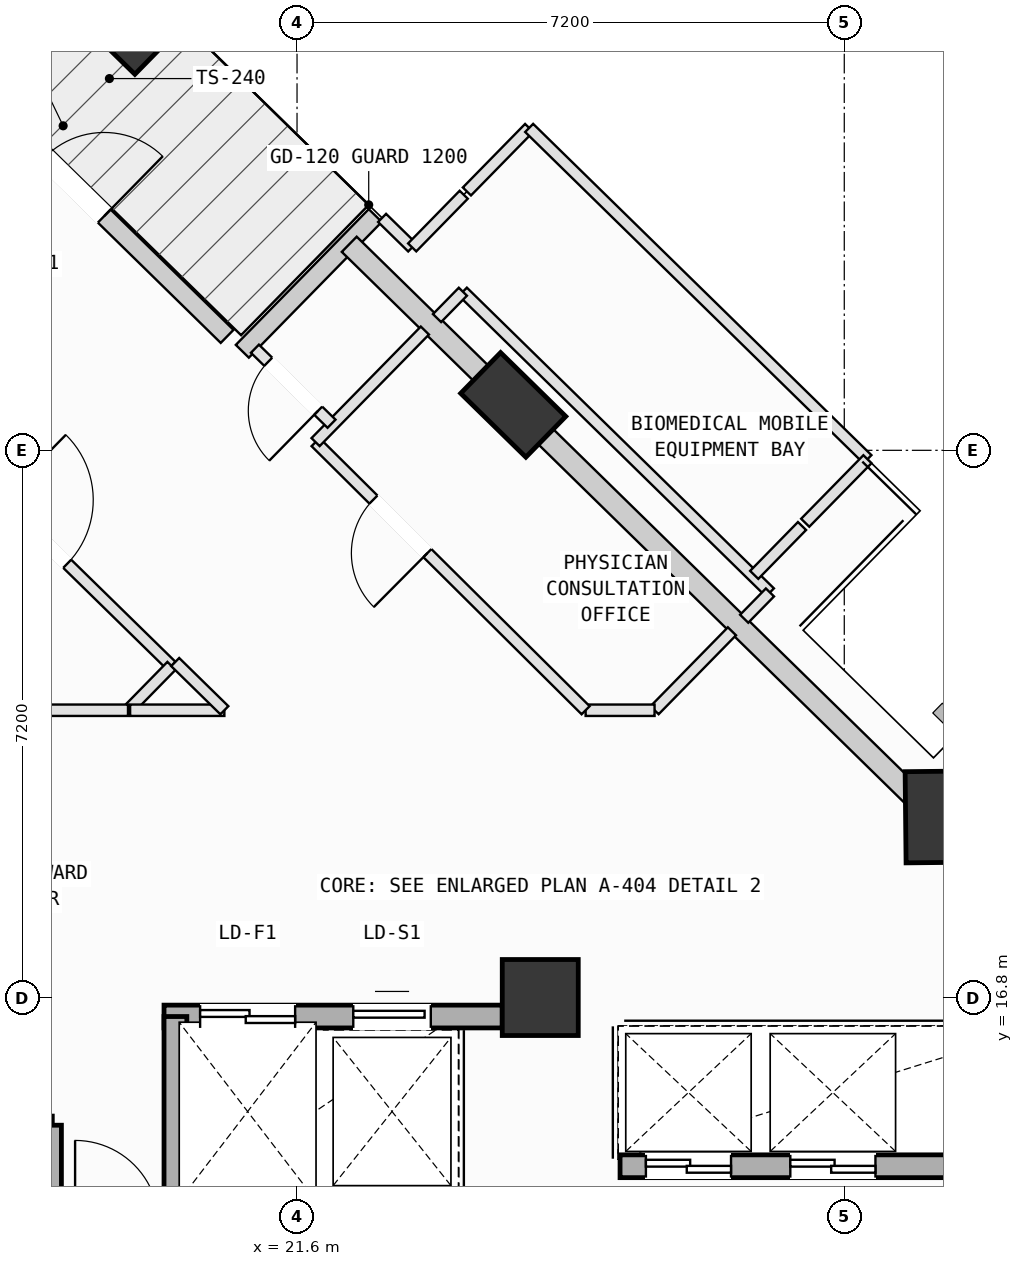
"""IFC4 building model, lengths in metres.
Left out: names, types, materials, properties, quantities, classifications, styles, units other than length and angle.
Written with IfcOpenShell. Run it as: python <this file> out.ifc"""

import sys

from ifc_helpers import new_model, si_unit, direction, frame, frame_2d, origin, origin_2d, place, context, subcontext, project, spatial, rectangle, extrude, element, fill, save


model = new_model("IFC4")
c1 = context("Model", 3, precision=1e-05, world=origin(), true_north=direction((0.0, 1.0)))
c2 = subcontext(c1, "Body", "Model", "MODEL_VIEW")
j1 = project(units=[si_unit("LENGTHUNIT", "METRE"), si_unit("PLANEANGLEUNIT", "RADIAN")], contexts=[c1])
p1 = place(None, origin())
s1 = spatial("IfcSite", under=j1, at=p1, CompositionType="ELEMENT")
p2 = place(p1, origin())
s2 = spatial("IfcBuilding", under=s1, at=p2, CompositionType="ELEMENT")
p3 = place(p2, frame((0.0, 0.0, 219.2)))
s3 = spatial("IfcBuildingStorey", under=s2, at=p3, CompositionType="ELEMENT", Elevation=219.2)
p4 = place(p3, frame((24.8, 16.8, 0.0), z_axis=(0.0, 0.0, 1.0), x_axis=(1.0, 0.0, 0.0)))
e1 = element("IfcColumn", 1, at=p4, inside=s3, PredefinedType="COLUMN", context=c2, shape_type="SweptSolid", body=[
    extrude(rectangle(XDim=1.0, YDim=1.0, at=origin_2d()), origin(), (0.0, 0.0, 1.0), 4.0),
])
p5 = place(p3, frame((29.982, 19.176, 0.002), z_axis=(0.023449963828, -0.014778362621, 0.999615775783), x_axis=(-0.851223767602, 0.524070492315, 0.027716719769)))
e2 = element("IfcColumn", 2, at=p5, inside=s3, PredefinedType="COLUMN", context=c2, shape_type="SweptSolid", body=[
    extrude(rectangle(XDim=1.2, YDim=0.75, at=origin_2d()), origin(), (0.0, 0.0, 1.0), 3.998),
])
p6 = place(p3, frame((24.445, 24.598, 0.002), z_axis=(0.001159895474, -0.037910267855, 0.999280474258), x_axis=(-0.735519864847, 0.67698325291, 0.02653683655)))
e3 = element("IfcColumn", 3, at=p6, inside=s3, PredefinedType="COLUMN", context=c2, shape_type="SweptSolid", body=[
    extrude(rectangle(XDim=1.2, YDim=0.75, at=origin_2d()), origin(), (0.0, 0.0, 1.0), 3.999),
])
p7 = place(p3, frame((19.3, 29.635, 0.002), z_axis=(-0.019510987692, -0.059325596951, 0.998047992286), x_axis=(-0.460549166871, 0.886558064773, 0.043695110491)))
e4 = element("IfcColumn", 4, at=p7, inside=s3, PredefinedType="COLUMN", context=c2, shape_type="SweptSolid", body=[
    extrude(rectangle(XDim=1.2, YDim=0.75, at=origin_2d()), origin(), (0.0, 0.0, 1.0), 4.004),
])
p8 = place(p3, frame((15.708, 30.369, 0.0), z_axis=(0.0, 0.0, 1.0), x_axis=(0.71445197499, -0.699684482773, 0.0)))
e5 = element("IfcWall", 5, at=p8, inside=s3, PredefinedType="SOLIDWALL", context=c2, shape_type="SweptSolid", body=[
    extrude(rectangle(XDim=6.96, YDim=0.24, at=frame_2d((3.48, 0.0))), origin(), (0.0, 0.0, 1.0), 3.265),
])
p9 = place(p8, frame((3.597, 0.0, 0.0)))
e6 = element("IfcOpeningElement", 6, at=p9, cuts=e5, PredefinedType="OPENING", context=c2, shape_type="SweptSolid", body=[
    extrude(rectangle(XDim=1.1, YDim=2.15, at=frame_2d((0.55, 1.075))), frame((0.0, 0.13, 0.0), z_axis=(0.0, -1.0, 0.0), x_axis=(1.0, 0.0, 0.0)), (0.0, 0.0, 1.0), 0.26),
])
p10 = place(p3, frame((20.88, 25.303, 0.0), z_axis=(0.0, 0.0, 1.0), x_axis=(0.699645566709, 0.714490084595, 0.0)))
e7 = element("IfcWall", 7, at=p10, inside=s3, PredefinedType="SOLIDWALL", context=c2, shape_type="SweptSolid", body=[
    extrude(rectangle(XDim=2.5, YDim=0.24, at=frame_2d((1.25, 0.0))), origin(), (0.0, 0.0, 1.0), 3.265),
])
p11 = place(p3, frame((24.765, 24.284, 0.0), z_axis=(0.0, 0.0, 1.0), x_axis=(0.714488866676, -0.699646810466, 0.0)))
e8 = element("IfcWall", 8, at=p11, inside=s3, PredefinedType="SOLIDWALL", context=c2, shape_type="SweptSolid", body=[
    extrude(rectangle(XDim=6.958, YDim=0.28, at=frame_2d((3.479, 0.0))), origin(), (0.0, 0.0, 1.0), 3.245),
])
p12 = place(p3, frame((22.287, 26.711, 0.0), z_axis=(0.0, 0.0, 1.0), x_axis=(0.714490507763, -0.699645134562, 0.0)))
e9 = element("IfcWall", 9, at=p12, inside=s3, PredefinedType="SOLIDWALL", context=c2, shape_type="SweptSolid", body=[
    extrude(rectangle(XDim=2.681, YDim=0.28, at=frame_2d((1.34, 0.0))), origin(), (0.0, 0.0, 1.0), 3.245),
])
p13 = place(p3, frame((14.92, 15.12, 0.0), z_axis=(0.0, 0.0, 1.0), x_axis=(1.0, 0.0, 0.0)))
e10 = element("IfcWall", 10, at=p13, inside=s3, PredefinedType="SOLIDWALL", context=c2, shape_type="SweptSolid", body=[
    extrude(rectangle(XDim=3.46, YDim=0.24, at=frame_2d((1.73, 0.0))), origin(), (0.0, 0.0, 1.0), 3.78),
])
p14 = place(p13, frame((0.22, 0.0, 0.0)))
e11 = element("IfcOpeningElement", 11, at=p14, cuts=e10, PredefinedType="OPENING", context=c2, shape_type="SweptSolid", body=[
    extrude(rectangle(XDim=1.1, YDim=2.15, at=frame_2d((0.55, 1.075))), frame((0.0, 0.13, 0.0), z_axis=(0.0, -1.0, 0.0), x_axis=(1.0, 0.0, 0.0)), (0.0, 0.0, 1.0), 0.26),
])
p15 = place(p3, frame((18.38, 15.12, 0.0), z_axis=(0.0, 0.0, 1.0), x_axis=(0.0, -1.0, 0.0)))
e12 = element("IfcWall", 12, at=p15, inside=s3, PredefinedType="SOLIDWALL", context=c2, shape_type="SweptSolid", body=[
    extrude(rectangle(XDim=7.045, YDim=0.24, at=frame_2d((3.522, 0.0))), origin(), (0.0, 0.0, 1.0), 3.78),
])
p16 = place(p3, frame((19.85, 16.55, 0.0), z_axis=(0.0, 0.0, 1.0), x_axis=(1.0, 0.0, 0.0)))
e13 = element("IfcWall", 13, at=p16, inside=s3, PredefinedType="SOLIDWALL", context=c2, shape_type="SweptSolid", body=[
    extrude(rectangle(XDim=4.45, YDim=0.3, at=frame_2d((2.225, 0.0))), origin(), (0.0, 0.0, 1.0), 3.78),
])
p17 = place(p16, frame((0.475, 0.0, 0.0)))
e14 = element("IfcOpeningElement", 14, at=p17, cuts=e13, PredefinedType="OPENING", context=c2, shape_type="SweptSolid", body=[
    extrude(rectangle(XDim=1.25, YDim=2.18, at=frame_2d((0.625, 1.09))), frame((0.0, 0.16, 0.0), z_axis=(0.0, -1.0, 0.0), x_axis=(1.0, 0.0, 0.0)), (0.0, 0.0, 1.0), 0.32),
])
p18 = place(p16, frame((2.49, 0.0, 0.0)))
e15 = element("IfcOpeningElement", 15, at=p18, cuts=e13, PredefinedType="OPENING", context=c2, shape_type="SweptSolid", body=[
    extrude(rectangle(XDim=1.02, YDim=2.12, at=frame_2d((0.51, 1.06))), frame((0.0, 0.16, 0.0), z_axis=(0.0, -1.0, 0.0), x_axis=(1.0, 0.0, 0.0)), (0.0, 0.0, 1.0), 0.32),
])
p19 = place(p3, frame((20.0, 13.82, 0.0), z_axis=(0.0, 0.0, 1.0), x_axis=(0.0, 1.0, 0.0)))
e16 = element("IfcWall", 16, at=p19, inside=s3, PredefinedType="SOLIDWALL", context=c2, shape_type="SweptSolid", body=[
    extrude(rectangle(XDim=2.73, YDim=0.3, at=frame_2d((1.365, 0.0))), origin(), (0.0, 0.0, 1.0), 3.78),
])
p20 = place(p3, frame((25.85, 14.58, 0.0), z_axis=(0.0, 0.0, 1.0), x_axis=(1.0, 0.0, 0.0)))
e17 = element("IfcWall", 17, at=p20, inside=s3, PredefinedType="SOLIDWALL", context=c2, shape_type="SweptSolid", body=[
    extrude(rectangle(XDim=5.45, YDim=0.3, at=frame_2d((2.725, 0.0))), origin(), (0.0, 0.0, 1.0), 3.78),
])
p21 = place(p20, frame((0.34, 0.0, 0.0)))
e18 = element("IfcOpeningElement", 18, at=p21, cuts=e17, PredefinedType="OPENING", context=c2, shape_type="SweptSolid", body=[
    extrude(rectangle(XDim=1.12, YDim=2.15, at=frame_2d((0.56, 1.075))), frame((0.0, 0.16, 0.0), z_axis=(0.0, -1.0, 0.0), x_axis=(1.0, 0.0, 0.0)), (0.0, 0.0, 1.0), 0.32),
])
p22 = place(p20, frame((2.24, 0.0, 0.0)))
e19 = element("IfcOpeningElement", 19, at=p22, cuts=e17, PredefinedType="OPENING", context=c2, shape_type="SweptSolid", body=[
    extrude(rectangle(XDim=1.12, YDim=2.15, at=frame_2d((0.56, 1.075))), frame((0.0, 0.16, 0.0), z_axis=(0.0, -1.0, 0.0), x_axis=(1.0, 0.0, 0.0)), (0.0, 0.0, 1.0), 0.32),
])
p23 = place(p3, frame((16.347, 24.69, 0.0), z_axis=(0.0, 0.0, 1.0), x_axis=(0.714527579213, -0.699607274508, 0.0)))
e20 = element("IfcWall", 20, at=p23, inside=s3, PredefinedType="PARTITIONING", context=c2, shape_type="SweptSolid", body=[
    extrude(rectangle(XDim=5.04, YDim=0.15, at=frame_2d((2.52, 0.0))), origin(), (0.0, 0.0, 1.0), 3.78),
])
p24 = place(p23, frame((1.92, 0.0, 0.0)))
e21 = element("IfcOpeningElement", 21, at=p24, cuts=e20, PredefinedType="OPENING", context=c2, shape_type="SweptSolid", body=[
    extrude(rectangle(XDim=1.2, YDim=2.15, at=frame_2d((0.6, 1.075))), frame((0.0, 0.085, 0.0), z_axis=(0.0, -1.0, 0.0), x_axis=(1.0, 0.0, 0.0)), (0.0, 0.0, 1.0), 0.17),
])
p25 = place(p3, frame((19.948, 21.164, 0.0), z_axis=(0.0, 0.0, 1.0), x_axis=(-0.699751841197, -0.714386002622, 0.0)))
e22 = element("IfcWall", 22, at=p25, inside=s3, PredefinedType="PARTITIONING", context=c2, shape_type="SweptSolid", body=[
    extrude(rectangle(XDim=0.817, YDim=0.15, at=frame_2d((0.409, 0.0))), origin(), (0.0, 0.0, 1.0), 3.78),
])
p26 = place(p3, frame((19.376, 20.58, 0.0), z_axis=(0.0, 0.0, 1.0), x_axis=(-1.0, 0.0, 0.0)))
e23 = element("IfcWall", 23, at=p26, inside=s3, PredefinedType="PARTITIONING", context=c2, shape_type="SweptSolid", body=[
    extrude(rectangle(XDim=4.379, YDim=0.15, at=frame_2d((2.189, 0.0))), origin(), (0.0, 0.0, 1.0), 3.78),
])
p27 = place(p3, frame((23.782, 26.087, 0.0), z_axis=(0.0, 0.0, 1.0), x_axis=(0.71440790838, -0.699729476615, 0.0)))
e24 = element("IfcWall", 24, at=p27, inside=s3, PredefinedType="PARTITIONING", context=c2, shape_type="SweptSolid", body=[
    extrude(rectangle(XDim=5.655, YDim=0.15, at=frame_2d((2.828, 0.0))), origin(), (0.0, 0.0, 1.0), 3.78),
])
p28 = place(p3, frame((27.822, 22.13, 0.0), z_axis=(0.0, 0.0, 1.0), x_axis=(-0.700015982854, -0.714127176173, 0.0)))
e25 = element("IfcWall", 25, at=p28, inside=s3, PredefinedType="PARTITIONING", context=c2, shape_type="SweptSolid", body=[
    extrude(rectangle(XDim=0.484, YDim=0.15, at=frame_2d((0.242, 0.0))), origin(), (0.0, 0.0, 1.0), 3.78),
])
p29 = place(p3, frame((27.322, 21.619, 0.0), z_axis=(0.0, 0.0, 1.0), x_axis=(-0.69993714437, -0.714204448272, 0.0)))
e26 = element("IfcWall", 26, at=p29, inside=s3, PredefinedType="PARTITIONING", context=c2, shape_type="SweptSolid", body=[
    extrude(rectangle(XDim=1.455, YDim=0.15, at=frame_2d((0.727, 0.0))), origin(), (0.0, 0.0, 1.0), 3.78),
])
p30 = place(p3, frame((26.304, 20.58, 0.0), z_axis=(0.0, 0.0, 1.0), x_axis=(-1.0, 0.0, 0.0)))
e27 = element("IfcWall", 27, at=p30, inside=s3, PredefinedType="PARTITIONING", context=c2, shape_type="SweptSolid", body=[
    extrude(rectangle(XDim=0.907, YDim=0.15, at=frame_2d((0.454, 0.0))), origin(), (0.0, 0.0, 1.0), 3.78),
])
p31 = place(p3, frame((25.397, 20.58, 0.0), z_axis=(0.0, 0.0, 1.0), x_axis=(-0.709613494775, 0.704591149557, 0.0)))
e28 = element("IfcWall", 28, at=p31, inside=s3, PredefinedType="PARTITIONING", context=c2, shape_type="SweptSolid", body=[
    extrude(rectangle(XDim=5.007, YDim=0.15, at=frame_2d((2.503, 0.0))), origin(), (0.0, 0.0, 1.0), 3.78),
])
p32 = place(p31, frame((2.934, 0.0, 0.0)))
e29 = element("IfcOpeningElement", 29, at=p32, cuts=e28, PredefinedType="OPENING", context=c2, shape_type="SweptSolid", body=[
    extrude(rectangle(XDim=1.0, YDim=2.12, at=frame_2d((0.5, 1.06))), frame((0.0, 0.085, 0.0), z_axis=(0.0, -1.0, 0.0), x_axis=(1.0, 0.0, 0.0)), (0.0, 0.0, 1.0), 0.17),
])
p33 = place(p3, frame((21.844, 24.108, 0.0), z_axis=(0.0, 0.0, 1.0), x_axis=(0.699762512538, 0.714375549726, 0.0)))
e30 = element("IfcWall", 30, at=p33, inside=s3, PredefinedType="PARTITIONING", context=c2, shape_type="SweptSolid", body=[
    extrude(rectangle(XDim=2.055, YDim=0.15, at=frame_2d((1.027, 0.0))), origin(), (0.0, 0.0, 1.0), 3.78),
])
p34 = place(p3, frame((23.442, 25.74, 0.0), z_axis=(0.0, 0.0, 1.0), x_axis=(0.700036239273, 0.714107319459, 0.0)))
e31 = element("IfcWall", 31, at=p34, inside=s3, PredefinedType="PARTITIONING", context=c2, shape_type="SweptSolid", body=[
    extrude(rectangle(XDim=0.486, YDim=0.15, at=frame_2d((0.243, 0.0))), origin(), (0.0, 0.0, 1.0), 3.78),
])
p35 = place(p3, frame((20.644, 20.58, 0.0), z_axis=(0.0, 0.0, 1.0), x_axis=(-1.0, 0.0, 0.0)))
e32 = element("IfcWall", 32, at=p35, inside=s3, PredefinedType="PARTITIONING", context=c2, shape_type="SweptSolid", body=[
    extrude(rectangle(XDim=1.24, YDim=0.15, at=frame_2d((0.62, 0.0))), origin(), (0.0, 0.0, 1.0), 3.78),
])
p36 = place(p3, frame((19.997, 21.214, 0.0), z_axis=(0.0, 0.0, 1.0), x_axis=(0.714212839143, -0.69992858236, 0.0)))
e33 = element("IfcWall", 33, at=p36, inside=s3, PredefinedType="PARTITIONING", context=c2, shape_type="SweptSolid", body=[
    extrude(rectangle(XDim=0.906, YDim=0.15, at=frame_2d((0.453, 0.0))), origin(), (0.0, 0.0, 1.0), 3.78),
])
p37 = place(p3, frame((22.054, 24.35, 0.0), z_axis=(0.0, 0.0, 1.0), x_axis=(-0.714595133376, 0.699538272973, 0.0)))
e34 = element("IfcWall", 34, at=p37, inside=s3, PredefinedType="PARTITIONING", context=c2, shape_type="SweptSolid", body=[
    extrude(rectangle(XDim=1.411, YDim=0.15, at=frame_2d((0.705, 0.0))), origin(), (0.0, 0.0, 1.0), 3.78),
])
p38 = place(p37, frame((0.245, 0.0, 0.0)))
e35 = element("IfcOpeningElement", 35, at=p38, cuts=e34, PredefinedType="OPENING", context=c2, shape_type="SweptSolid", body=[
    extrude(rectangle(XDim=0.92, YDim=2.1, at=frame_2d((0.46, 1.05))), frame((0.0, 0.085, 0.0), z_axis=(0.0, -1.0, 0.0), x_axis=(1.0, 0.0, 0.0)), (0.0, 0.0, 1.0), 0.17),
])
p39 = place(p3, frame((22.719, 27.058, 0.0), z_axis=(0.0, 0.0, 1.0), x_axis=(0.714115992934, -0.700027391347, 0.0)))
e36 = element("IfcWall", 36, at=p39, inside=s3, PredefinedType="PARTITIONING", context=c2, shape_type="SweptSolid", body=[
    extrude(rectangle(XDim=0.554, YDim=0.15, at=frame_2d((0.277, 0.0))), origin(), (0.0, 0.0, 1.0), 3.78),
])
p40 = place(p3, frame((23.115, 26.67, 0.0), z_axis=(0.0, 0.0, 1.0), x_axis=(0.699257791753, 0.71486959697, 0.0)))
e37 = element("IfcWall", 37, at=p40, inside=s3, PredefinedType="PARTITIONING", context=c2, shape_type="SweptSolid", body=[
    extrude(rectangle(XDim=0.969, YDim=0.15, at=frame_2d((0.485, 0.0))), origin(), (0.0, 0.0, 1.0), 3.78),
])
p41 = place(p3, frame((28.244, 23.004, 0.0), z_axis=(0.0, 0.0, 1.0), x_axis=(-0.699327327342, -0.714801573328, 0.0)))
e38 = element("IfcWall", 38, at=p41, inside=s3, PredefinedType="PARTITIONING", context=c2, shape_type="SweptSolid", body=[
    extrude(rectangle(XDim=0.899, YDim=0.15, at=frame_2d((0.45, 0.0))), origin(), (0.0, 0.0, 1.0), 3.78),
])
p42 = place(p3, frame((23.835, 27.406, 0.0), z_axis=(0.0, 0.0, 1.0), x_axis=(0.699873247093, 0.714267063501, 0.0)))
e39 = element("IfcWall", 39, at=p42, inside=s3, PredefinedType="PARTITIONING", context=c2, shape_type="SweptSolid", body=[
    extrude(rectangle(XDim=1.17, YDim=0.15, at=frame_2d((0.585, 0.0))), origin(), (0.0, 0.0, 1.0), 3.78),
])
p43 = place(p3, frame((24.654, 28.242, 0.0), z_axis=(0.0, 0.0, 1.0), x_axis=(0.714455326906, -0.699681060095, 0.0)))
e40 = element("IfcWall", 40, at=p43, inside=s3, PredefinedType="PARTITIONING", context=c2, shape_type="SweptSolid", body=[
    extrude(rectangle(XDim=6.23, YDim=0.15, at=frame_2d((3.115, 0.0))), origin(), (0.0, 0.0, 1.0), 3.78),
])
p44 = place(p3, frame((29.105, 23.883, 0.0), z_axis=(0.0, 0.0, 1.0), x_axis=(-0.699873247093, -0.714267063501, 0.0)))
e41 = element("IfcWall", 41, at=p44, inside=s3, PredefinedType="PARTITIONING", context=c2, shape_type="SweptSolid", body=[
    extrude(rectangle(XDim=1.17, YDim=0.15, at=frame_2d((0.585, 0.0))), origin(), (0.0, 0.0, 1.0), 3.78),
])
p45 = place(p9, origin())
e42 = element("IfcDoor", 42, at=p45, inside=s3, OperationType="SINGLE_SWING_RIGHT", PredefinedType="DOOR", context=c2, shape_type="SweptSolid", body=[
    extrude(rectangle(XDim=1.1, YDim=2.15, at=frame_2d((0.55, 1.075))), frame((0.0, 0.025, 0.0), z_axis=(0.0, -1.0, 0.0), x_axis=(1.0, 0.0, 0.0)), (0.0, 0.0, 1.0), 0.05),
])
fill(e6, e42)
p46 = place(p21, origin())
e43 = element("IfcDoor", 43, at=p46, inside=s3, OperationType="DOUBLE_DOOR_SLIDING", PredefinedType="DOOR", context=c2, shape_type="SweptSolid", body=[
    extrude(rectangle(XDim=1.12, YDim=2.15, at=frame_2d((0.56, 1.075))), frame((0.0, 0.025, 0.0), z_axis=(0.0, -1.0, 0.0), x_axis=(1.0, 0.0, 0.0)), (0.0, 0.0, 1.0), 0.05),
])
fill(e18, e43)
p47 = place(p22, origin())
e44 = element("IfcDoor", 44, at=p47, inside=s3, OperationType="DOUBLE_DOOR_SLIDING", PredefinedType="DOOR", context=c2, shape_type="SweptSolid", body=[
    extrude(rectangle(XDim=1.12, YDim=2.15, at=frame_2d((0.56, 1.075))), frame((0.0, 0.025, 0.0), z_axis=(0.0, -1.0, 0.0), x_axis=(1.0, 0.0, 0.0)), (0.0, 0.0, 1.0), 0.05),
])
fill(e19, e44)
p48 = place(p17, origin())
e45 = element("IfcDoor", 45, at=p48, inside=s3, OperationType="DOUBLE_DOOR_SLIDING", PredefinedType="DOOR", context=c2, shape_type="SweptSolid", body=[
    extrude(rectangle(XDim=1.25, YDim=2.18, at=frame_2d((0.625, 1.09))), frame((0.0, 0.025, 0.0), z_axis=(0.0, -1.0, 0.0), x_axis=(1.0, 0.0, 0.0)), (0.0, 0.0, 1.0), 0.05),
])
fill(e14, e45)
p49 = place(p18, origin())
e46 = element("IfcDoor", 46, at=p49, inside=s3, OperationType="SLIDING_TO_LEFT", PredefinedType="DOOR", context=c2, shape_type="SweptSolid", body=[
    extrude(rectangle(XDim=1.02, YDim=2.12, at=frame_2d((0.51, 1.06))), frame((0.0, 0.025, 0.0), z_axis=(0.0, -1.0, 0.0), x_axis=(1.0, 0.0, 0.0)), (0.0, 0.0, 1.0), 0.05),
])
fill(e15, e46)
p50 = place(p24, origin())
e47 = element("IfcDoor", 47, at=p50, inside=s3, OperationType="SINGLE_SWING_LEFT", PredefinedType="DOOR", context=c2, shape_type="SweptSolid", body=[
    extrude(rectangle(XDim=1.2, YDim=2.15, at=frame_2d((0.6, 1.075))), frame((0.0, 0.025, 0.0), z_axis=(0.0, -1.0, 0.0), x_axis=(1.0, 0.0, 0.0)), (0.0, 0.0, 1.0), 0.05),
])
fill(e21, e47)
p51 = place(p32, origin())
e48 = element("IfcDoor", 48, at=p51, inside=s3, OperationType="SINGLE_SWING_LEFT", PredefinedType="DOOR", context=c2, shape_type="SweptSolid", body=[
    extrude(rectangle(XDim=1.0, YDim=2.12, at=frame_2d((0.5, 1.06))), frame((0.0, 0.025, 0.0), z_axis=(0.0, -1.0, 0.0), x_axis=(1.0, 0.0, 0.0)), (0.0, 0.0, 1.0), 0.05),
])
fill(e29, e48)
p52 = place(p38, origin())
e49 = element("IfcDoor", 49, at=p52, inside=s3, OperationType="SINGLE_SWING_LEFT", PredefinedType="DOOR", context=c2, shape_type="SweptSolid", body=[
    extrude(rectangle(XDim=0.92, YDim=2.1, at=frame_2d((0.46, 1.05))), frame((0.0, 0.025, 0.0), z_axis=(0.0, -1.0, 0.0), x_axis=(1.0, 0.0, 0.0)), (0.0, 0.0, 1.0), 0.05),
])
fill(e35, e49)
save(model, sys.argv[1])
